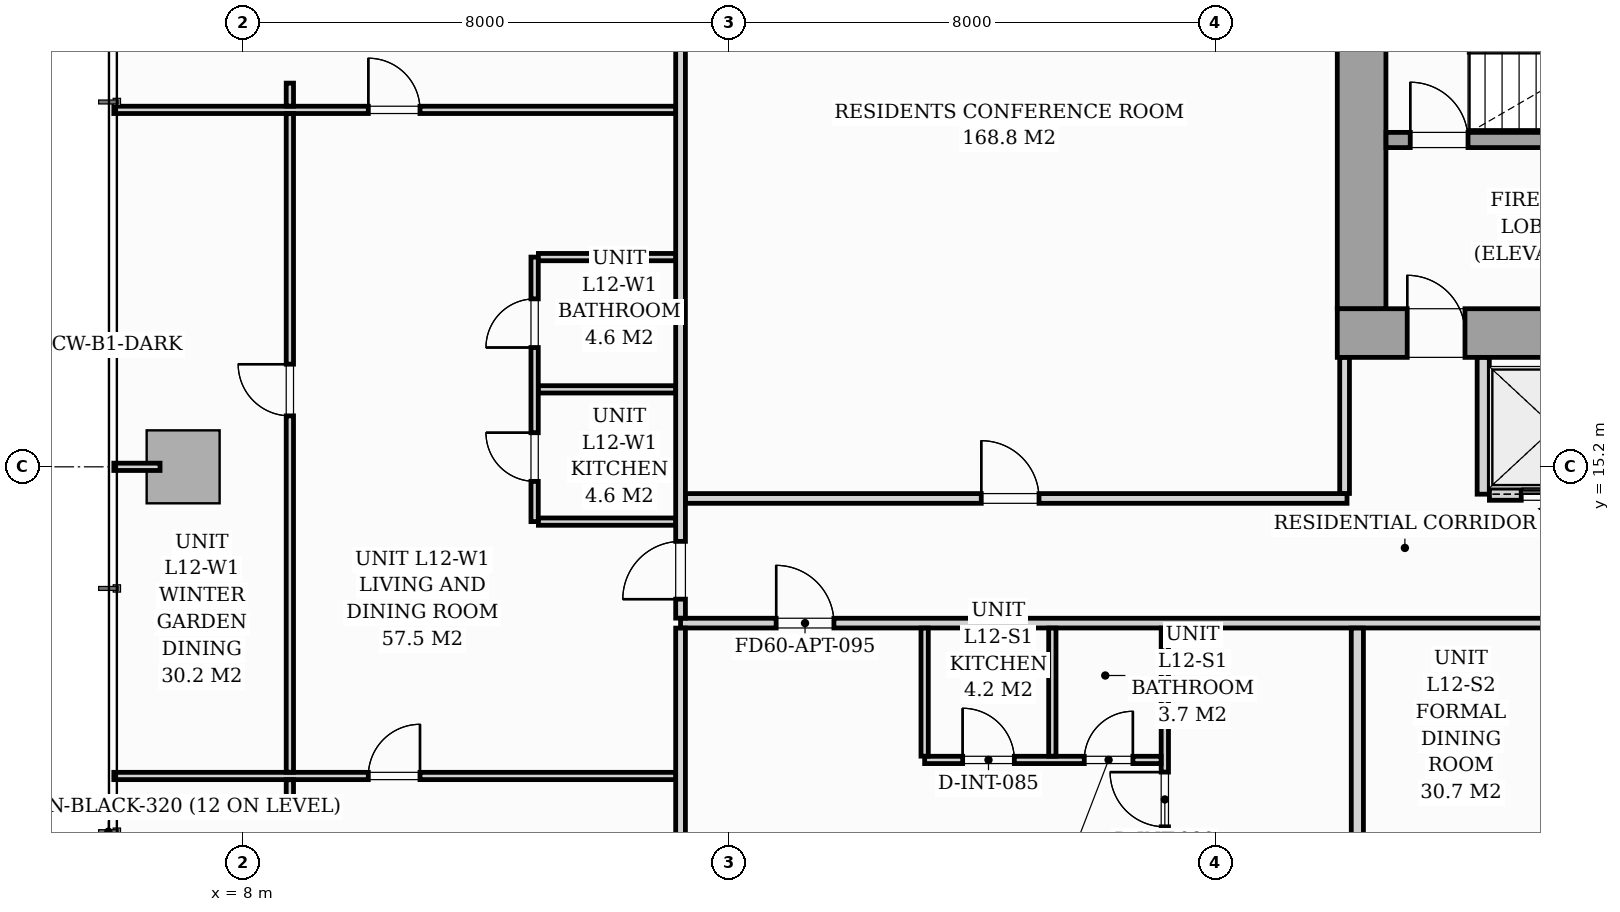
"""IFC4 building model, lengths in metres.
Left out: names, types, materials, properties, quantities, classifications, styles, units other than length and angle.
Written with IfcOpenShell. Run it as: python <this file> out.ifc"""

import sys

from ifc_helpers import new_model, si_unit, direction, frame, frame_2d, origin, origin_2d, place, context, subcontext, project, spatial, rectangle, i_section, extrude, source, transform, mapped, element, fill, save


model = new_model("IFC4")
c1 = context("Model", 3, precision=1e-05, world=origin(), true_north=direction((0.0, 1.0)))
c2 = subcontext(c1, "Body", "Model", "MODEL_VIEW")
j1 = project(units=[si_unit("LENGTHUNIT", "METRE"), si_unit("PLANEANGLEUNIT", "RADIAN")], contexts=[c1])
p1 = place(None, origin())
s1 = spatial("IfcSite", under=j1, at=p1, CompositionType="ELEMENT")
p2 = place(p1, origin())
s2 = spatial("IfcBuilding", under=s1, at=p2, CompositionType="ELEMENT")
p3 = place(p2, frame((0.0, 0.0, 45.4)))
s3 = spatial("IfcBuildingStorey", under=s2, at=p3, CompositionType="ELEMENT", Elevation=45.4)
m1 = source(origin(), c2, "Body", "SweptSolid", [
    extrude(i_section(OverallWidth=0.437, OverallDepth=0.514, WebThickness=0.061, FlangeThickness=0.097, FilletRadius=0.018, at=origin_2d()), origin(), (0.0, 0.0, 1.0), 3.196),
])
p4 = place(p3, frame((26.4, 17.4, 0.002), z_axis=(0.0, 0.0, 1.0), x_axis=(1.0, 0.0, 0.0)))
e1 = element("IfcColumn", 1, at=p4, inside=s3, PredefinedType="PILASTER", context=c2, shape_type="MappedRepresentation", body=[
    mapped(m1, transform((0.0, 0.0, 0.0), scale=1.0)),
])
m2 = source(origin(), c2, "Body", "SweptSolid", [
    extrude(rectangle(XDim=1.2, YDim=1.2, at=origin_2d()), origin(), (0.0, 0.0, 1.0), 3.196),
])
p5 = place(p3, frame((7.02, 15.2, 0.002), z_axis=(0.0, 0.0, 1.0), x_axis=(1.0, 0.0, 0.0)))
e2 = element("IfcColumn", 2, at=p5, inside=s3, PredefinedType="COLUMN", context=c2, shape_type="MappedRepresentation", body=[
    mapped(m2, transform((0.0, 0.0, 0.0), scale=1.0)),
])
p6 = place(p3, frame((26.0, 17.4, 0.0), z_axis=(0.0, 0.0, 1.0), x_axis=(1.0, 0.0, 0.0)))
e3 = element("IfcWall", 3, at=p6, inside=s3, PredefinedType="SHEAR", context=c2, shape_type="SweptSolid", body=[
    extrude(rectangle(XDim=20.0, YDim=0.8, at=frame_2d((10.0, 0.0))), origin(), (0.0, 0.0, 1.0), 3.2),
])
p7 = place(p6, frame((1.15, 0.0, 0.0)))
e4 = element("IfcOpeningElement", 4, at=p7, cuts=e3, PredefinedType="OPENING", context=c2, shape_type="SweptSolid", body=[
    extrude(rectangle(XDim=0.95, YDim=2.06, at=frame_2d((0.475, 1.03))), frame((0.0, 0.41, 0.0), z_axis=(0.0, -1.0, 0.0), x_axis=(1.0, 0.0, 0.0)), (0.0, 0.0, 1.0), 0.82),
])
p8 = place(p6, frame((9.58, 0.0, 0.0)))
e5 = element("IfcOpeningElement", 5, at=p8, cuts=e3, PredefinedType="OPENING", context=c2, shape_type="SweptSolid", body=[
    extrude(rectangle(XDim=0.85, YDim=2.0, at=frame_2d((0.425, 1.0))), frame((0.0, 0.41, 0.0), z_axis=(0.0, -1.0, 0.0), x_axis=(1.0, 0.0, 0.0)), (0.0, 0.0, 1.0), 0.82),
])
p9 = place(p6, frame((17.75, 0.0, 0.0)))
e6 = element("IfcOpeningElement", 6, at=p9, cuts=e3, PredefinedType="OPENING", context=c2, shape_type="SweptSolid", body=[
    extrude(rectangle(XDim=0.95, YDim=2.06, at=frame_2d((0.475, 1.03))), frame((0.0, 0.41, 0.0), z_axis=(0.0, -1.0, 0.0), x_axis=(1.0, 0.0, 0.0)), (0.0, 0.0, 1.0), 0.82),
])
p10 = place(p3, frame((26.4, 17.802, 0.0), z_axis=(0.0, 0.0, 1.0), x_axis=(0.0, 1.0, 0.0)))
e7 = element("IfcWall", 7, at=p10, inside=s3, PredefinedType="SHEAR", context=c2, shape_type="SweptSolid", body=[
    extrude(rectangle(XDim=5.796, YDim=0.8, at=frame_2d((2.898, 0.0))), origin(), (0.0, 0.0, 1.0), 3.2),
])
p11 = place(p3, frame((26.802, 20.575, 0.0), z_axis=(0.0, 0.0, 1.0), x_axis=(1.0, 0.0, 0.0)))
e8 = element("IfcWall", 8, at=p11, inside=s3, PredefinedType="SOLIDWALL", context=c2, shape_type="SweptSolid", body=[
    extrude(rectangle(XDim=8.148, YDim=0.25, at=frame_2d((4.074, 0.0))), origin(), (0.0, 0.0, 1.0), 3.2),
])
p12 = place(p11, frame((0.398, 0.0, 0.0)))
e9 = element("IfcOpeningElement", 9, at=p12, cuts=e8, PredefinedType="OPENING", context=c2, shape_type="SweptSolid", body=[
    extrude(rectangle(XDim=0.95, YDim=2.06, at=frame_2d((0.475, 1.03))), frame((0.0, 0.135, 0.0), z_axis=(0.0, -1.0, 0.0), x_axis=(1.0, 0.0, 0.0)), (0.0, 0.0, 1.0), 0.27),
])
p13 = place(p3, frame((28.4, 14.75, 0.0), z_axis=(0.0, 0.0, 1.0), x_axis=(0.0, 1.0, 0.0)))
e10 = element("IfcWall", 10, at=p13, inside=s3, PredefinedType="PARTITIONING", context=c2, shape_type="SweptSolid", body=[
    extrude(rectangle(XDim=2.248, YDim=0.2, at=frame_2d((1.124, 0.0))), origin(), (0.0, 0.0, 1.0), 2.94),
])
p14 = place(p3, frame((28.502, 14.75, 0.0), z_axis=(0.0, 0.0, 1.0), x_axis=(1.0, 0.0, 0.0)))
e11 = element("IfcWall", 11, at=p14, inside=s3, PredefinedType="PARTITIONING", context=c2, shape_type="SweptSolid", body=[
    extrude(rectangle(XDim=2.146, YDim=0.2, at=frame_2d((1.073, 0.0))), origin(), (0.0, 0.0, 1.0), 2.94),
])
p15 = place(p14, frame((0.523, 0.0, 0.0)))
e12 = element("IfcOpeningElement", 12, at=p15, cuts=e11, PredefinedType="OPENING", context=c2, shape_type="SweptSolid", body=[
    extrude(rectangle(XDim=1.05, YDim=2.08, at=frame_2d((0.525, 1.04))), frame((0.0, 0.11, 0.0), z_axis=(0.0, -1.0, 0.0), x_axis=(1.0, 0.0, 0.0)), (0.0, 0.0, 1.0), 0.22),
])
p16 = place(p3, frame((15.2, 12.63, 0.0), z_axis=(0.0, 0.0, 1.0), x_axis=(1.0, 0.0, 0.0)))
e13 = element("IfcWall", 13, at=p16, inside=s3, PredefinedType="PARTITIONING", context=c2, shape_type="SweptSolid", body=[
    extrude(rectangle(XDim=37.1, YDim=0.16, at=frame_2d((18.55, 0.0))), origin(), (0.0, 0.0, 1.0), 2.94),
])
p17 = place(p16, frame((1.572, 0.0, 0.0)))
e14 = element("IfcOpeningElement", 14, at=p17, cuts=e13, PredefinedType="OPENING", context=c2, shape_type="SweptSolid", body=[
    extrude(rectangle(XDim=0.95, YDim=2.06, at=frame_2d((0.475, 1.03))), frame((0.0, 0.09, 0.0), z_axis=(0.0, -1.0, 0.0), x_axis=(1.0, 0.0, 0.0)), (0.0, 0.0, 1.0), 0.18),
])
p18 = place(p16, frame((14.877, 0.0, 0.0)))
e15 = element("IfcOpeningElement", 15, at=p18, cuts=e13, PredefinedType="OPENING", context=c2, shape_type="SweptSolid", body=[
    extrude(rectangle(XDim=0.95, YDim=2.06, at=frame_2d((0.475, 1.03))), frame((0.0, 0.09, 0.0), z_axis=(0.0, -1.0, 0.0), x_axis=(1.0, 0.0, 0.0)), (0.0, 0.0, 1.0), 0.18),
])
p19 = place(p16, frame((28.476, 0.0, 0.0)))
e16 = element("IfcOpeningElement", 16, at=p19, cuts=e13, PredefinedType="OPENING", context=c2, shape_type="SweptSolid", body=[
    extrude(rectangle(XDim=0.95, YDim=2.06, at=frame_2d((0.475, 1.03))), frame((0.0, 0.09, 0.0), z_axis=(0.0, -1.0, 0.0), x_axis=(1.0, 0.0, 0.0)), (0.0, 0.0, 1.0), 0.18),
])
p20 = place(p3, frame((15.2, 2.962, 0.0), z_axis=(0.0, 0.0, 1.0), x_axis=(0.0, 1.0, 0.0)))
e17 = element("IfcWall", 17, at=p20, inside=s3, PredefinedType="PARTITIONING", context=c2, shape_type="SweptSolid", body=[
    extrude(rectangle(XDim=9.586, YDim=0.16, at=frame_2d((4.793, 0.0))), origin(), (0.0, 0.0, 1.0), 2.94),
])
p21 = place(p3, frame((15.2, 12.712, 0.0), z_axis=(0.0, 0.0, 1.0), x_axis=(0.0, 1.0, 0.0)))
e18 = element("IfcWall", 18, at=p21, inside=s3, PredefinedType="PARTITIONING", context=c2, shape_type="SweptSolid", body=[
    extrude(rectangle(XDim=14.726, YDim=0.16, at=frame_2d((7.363, 0.0))), origin(), (0.0, 0.0, 1.0), 2.94),
])
p22 = place(p21, frame((0.312, 0.0, 0.0)))
e19 = element("IfcOpeningElement", 19, at=p22, cuts=e18, PredefinedType="OPENING", context=c2, shape_type="SweptSolid", body=[
    extrude(rectangle(XDim=0.95, YDim=2.06, at=frame_2d((0.475, 1.03))), frame((0.0, 0.09, 0.0), z_axis=(0.0, -1.0, 0.0), x_axis=(1.0, 0.0, 0.0)), (0.0, 0.0, 1.0), 0.18),
])
p23 = place(p3, frame((23.164, 2.962, 0.0), z_axis=(0.0, 0.0, 1.0), x_axis=(0.0, 1.0, 0.0)))
e20 = element("IfcWall", 20, at=p23, inside=s3, PredefinedType="PARTITIONING", context=c2, shape_type="SweptSolid", body=[
    extrude(rectangle(XDim=9.586, YDim=0.12, at=frame_2d((4.793, 0.0))), origin(), (0.0, 0.0, 1.0), 2.94),
])
p24 = place(p23, frame((6.318, 0.0, 0.0)))
e21 = element("IfcOpeningElement", 21, at=p24, cuts=e20, PredefinedType="OPENING", context=c2, shape_type="SweptSolid", body=[
    extrude(rectangle(XDim=0.9, YDim=2.05, at=frame_2d((0.45, 1.025))), frame((0.0, 0.07, 0.0), z_axis=(0.0, -1.0, 0.0), x_axis=(1.0, 0.0, 0.0)), (0.0, 0.0, 1.0), 0.14),
])
p25 = place(p3, frame((19.214, 10.38, 0.0), z_axis=(0.0, 0.0, 1.0), x_axis=(1.0, 0.0, 0.0)))
e22 = element("IfcWall", 22, at=p25, inside=s3, PredefinedType="PARTITIONING", context=c2, shape_type="SweptSolid", body=[
    extrude(rectangle(XDim=3.888, YDim=0.12, at=frame_2d((1.944, 0.0))), origin(), (0.0, 0.0, 1.0), 2.94),
])
p26 = place(p25, frame((0.625, 0.0, 0.0)))
e23 = element("IfcOpeningElement", 23, at=p26, cuts=e22, PredefinedType="OPENING", context=c2, shape_type="SweptSolid", body=[
    extrude(rectangle(XDim=0.85, YDim=2.05, at=frame_2d((0.425, 1.025))), frame((0.0, 0.07, 0.0), z_axis=(0.0, -1.0, 0.0), x_axis=(1.0, 0.0, 0.0)), (0.0, 0.0, 1.0), 0.14),
])
p27 = place(p25, frame((2.625, 0.0, 0.0)))
e24 = element("IfcOpeningElement", 24, at=p27, cuts=e22, PredefinedType="OPENING", context=c2, shape_type="SweptSolid", body=[
    extrude(rectangle(XDim=0.8, YDim=2.02, at=frame_2d((0.4, 1.01))), frame((0.0, 0.07, 0.0), z_axis=(0.0, -1.0, 0.0), x_axis=(1.0, 0.0, 0.0)), (0.0, 0.0, 1.0), 0.14),
])
for number, where, z_axis, x_axis in (
    (25, (21.314, 10.442, 0.0), (0.0, 0.0, 1.0), (0.0, 1.0, 0.0)),
    (26, (19.214, 10.442, 0.0), (0.0, 0.0, 1.0), (0.0, 1.0, 0.0)),
):
    element("IfcWall", number, at=place(p3, frame(where, z_axis=z_axis, x_axis=x_axis)), inside=s3, PredefinedType="PARTITIONING", context=c2, shape_type="SweptSolid", body=[
        extrude(rectangle(XDim=2.106, YDim=0.12, at=frame_2d((1.053, 0.0))), origin(), (0.0, 0.0, 1.0), 2.94),
    ])
p28 = place(p3, frame((26.33, 2.78, 0.0), z_axis=(0.0, 0.0, 1.0), x_axis=(0.0, 1.0, 0.0)))
e27 = element("IfcWall", 27, at=p28, inside=s3, PredefinedType="PARTITIONING", context=c2, shape_type="SweptSolid", body=[
    extrude(rectangle(XDim=9.768, YDim=0.2, at=frame_2d((4.884, 0.0))), origin(), (0.0, 0.0, 1.0), 2.94),
])
p29 = place(p3, frame((12.8, 14.299, 0.0), z_axis=(0.0, 0.0, 1.0), x_axis=(0.0, 1.0, 0.0)))
e28 = element("IfcWall", 28, at=p29, inside=s3, PredefinedType="PARTITIONING", context=c2, shape_type="SweptSolid", body=[
    extrude(rectangle(XDim=4.35, YDim=0.12, at=frame_2d((2.175, 0.0))), origin(), (0.0, 0.0, 1.0), 2.94),
])
p30 = place(p29, frame((0.662, 0.0, 0.0)))
e29 = element("IfcOpeningElement", 29, at=p30, cuts=e28, PredefinedType="OPENING", context=c2, shape_type="SweptSolid", body=[
    extrude(rectangle(XDim=0.8, YDim=2.0, at=frame_2d((0.4, 1.0))), frame((0.0, 0.07, 0.0), z_axis=(0.0, -1.0, 0.0), x_axis=(1.0, 0.0, 0.0)), (0.0, 0.0, 1.0), 0.14),
])
p31 = place(p29, frame((2.863, 0.0, 0.0)))
e30 = element("IfcOpeningElement", 30, at=p31, cuts=e28, PredefinedType="OPENING", context=c2, shape_type="SweptSolid", body=[
    extrude(rectangle(XDim=0.8, YDim=2.02, at=frame_2d((0.4, 1.01))), frame((0.0, 0.07, 0.0), z_axis=(0.0, -1.0, 0.0), x_axis=(1.0, 0.0, 0.0)), (0.0, 0.0, 1.0), 0.14),
])
for number, where, z_axis, x_axis in (
    (31, (12.862, 16.474, 0.0), (0.0, 0.0, 1.0), (1.0, 0.0, 0.0)),
    (32, (12.862, 14.299, 0.0), (0.0, 0.0, 1.0), (1.0, 0.0, 0.0)),
    (33, (12.862, 18.649, 0.0), (0.0, 0.0, 1.0), (1.0, 0.0, 0.0)),
):
    element("IfcWall", number, at=place(p3, frame(where, z_axis=z_axis, x_axis=x_axis)), inside=s3, PredefinedType="PARTITIONING", context=c2, shape_type="SweptSolid", body=[
        extrude(rectangle(XDim=2.256, YDim=0.12, at=frame_2d((1.128, 0.0))), origin(), (0.0, 0.0, 1.0), 2.94),
    ])
p32 = place(p3, frame((5.88, 10.116, 0.0), z_axis=(0.0, 0.0, 1.0), x_axis=(1.0, 0.0, 0.0)))
e34 = element("IfcWall", 34, at=p32, inside=s3, PredefinedType="PARTITIONING", context=c2, shape_type="SweptSolid", body=[
    extrude(rectangle(XDim=9.238, YDim=0.12, at=frame_2d((4.619, 0.0))), origin(), (0.0, 0.0, 1.0), 2.94),
])
p33 = place(p32, frame((4.185, 0.0, 0.0)))
e35 = element("IfcOpeningElement", 35, at=p33, cuts=e34, PredefinedType="OPENING", context=c2, shape_type="SweptSolid", body=[
    extrude(rectangle(XDim=0.85, YDim=2.05, at=frame_2d((0.425, 1.025))), frame((0.0, 0.07, 0.0), z_axis=(0.0, -1.0, 0.0), x_axis=(1.0, 0.0, 0.0)), (0.0, 0.0, 1.0), 0.14),
])
p34 = place(p3, frame((5.88, 21.07, 0.0), z_axis=(0.0, 0.0, 1.0), x_axis=(1.0, 0.0, 0.0)))
e36 = element("IfcWall", 36, at=p34, inside=s3, PredefinedType="PARTITIONING", context=c2, shape_type="SweptSolid", body=[
    extrude(rectangle(XDim=9.238, YDim=0.12, at=frame_2d((4.619, 0.0))), origin(), (0.0, 0.0, 1.0), 2.94),
])
p35 = place(p34, frame((4.185, 0.0, 0.0)))
e37 = element("IfcOpeningElement", 37, at=p35, cuts=e36, PredefinedType="OPENING", context=c2, shape_type="SweptSolid", body=[
    extrude(rectangle(XDim=0.85, YDim=2.05, at=frame_2d((0.425, 1.025))), frame((0.0, 0.07, 0.0), z_axis=(0.0, -1.0, 0.0), x_axis=(1.0, 0.0, 0.0)), (0.0, 0.0, 1.0), 0.14),
])
p36 = place(p3, frame((8.775, 9.676, 0.0), z_axis=(0.0, 0.0, 1.0), x_axis=(0.0, 1.0, 0.0)))
e38 = element("IfcWall", 38, at=p36, inside=s3, PredefinedType="PARTITIONING", context=c2, shape_type="SweptSolid", body=[
    extrude(rectangle(XDim=0.378, YDim=0.12, at=frame_2d((0.189, 0.0))), origin(), (0.0, 0.0, 1.0), 2.94),
])
p37 = place(p3, frame((8.775, 10.178, 0.0), z_axis=(0.0, 0.0, 1.0), x_axis=(0.0, 1.0, 0.0)))
e39 = element("IfcWall", 39, at=p37, inside=s3, PredefinedType="PARTITIONING", context=c2, shape_type="SweptSolid", body=[
    extrude(rectangle(XDim=10.83, YDim=0.12, at=frame_2d((5.415, 0.0))), origin(), (0.0, 0.0, 1.0), 2.94),
])
p38 = place(p37, frame((5.86, 0.0, 0.0)))
e40 = element("IfcOpeningElement", 40, at=p38, cuts=e39, PredefinedType="OPENING", context=c2, shape_type="SweptSolid", body=[
    extrude(rectangle(XDim=0.85, YDim=2.05, at=frame_2d((0.425, 1.025))), frame((0.0, 0.07, 0.0), z_axis=(0.0, -1.0, 0.0), x_axis=(1.0, 0.0, 0.0)), (0.0, 0.0, 1.0), 0.14),
])
p39 = place(p3, frame((8.775, 21.132, 0.0), z_axis=(0.0, 0.0, 1.0), x_axis=(0.0, 1.0, 0.0)))
e41 = element("IfcWall", 41, at=p39, inside=s3, PredefinedType="PARTITIONING", context=c2, shape_type="SweptSolid", body=[
    extrude(rectangle(XDim=0.378, YDim=0.12, at=frame_2d((0.189, 0.0))), origin(), (0.0, 0.0, 1.0), 2.94),
])
p40 = place(p3, frame((15.282, 14.68, 0.0), z_axis=(0.0, 0.0, 1.0), x_axis=(1.0, 0.0, 0.0)))
e42 = element("IfcWall", 42, at=p40, inside=s3, PredefinedType="PARTITIONING", context=c2, shape_type="SweptSolid", body=[
    extrude(rectangle(XDim=10.878, YDim=0.16, at=frame_2d((5.439, 0.0))), origin(), (0.0, 0.0, 1.0), 2.94),
])
p41 = place(p40, frame((4.863, 0.0, 0.0)))
e43 = element("IfcOpeningElement", 43, at=p41, cuts=e42, PredefinedType="OPENING", context=c2, shape_type="SweptSolid", body=[
    extrude(rectangle(XDim=0.95, YDim=2.06, at=frame_2d((0.475, 1.03))), frame((0.0, 0.09, 0.0), z_axis=(0.0, -1.0, 0.0), x_axis=(1.0, 0.0, 0.0)), (0.0, 0.0, 1.0), 0.18),
])
p42 = place(p3, frame((26.12, 14.762, 0.0), z_axis=(0.0, 0.0, 1.0), x_axis=(0.0, 1.0, 0.0)))
e44 = element("IfcWall", 44, at=p42, inside=s3, PredefinedType="PARTITIONING", context=c2, shape_type="SweptSolid", body=[
    extrude(rectangle(XDim=2.236, YDim=0.16, at=frame_2d((1.118, 0.0))), origin(), (0.0, 0.0, 1.0), 2.94),
])
p43 = place(p3, frame((6.64, 15.2, 0.0), z_axis=(0.0, 0.0, 1.0), x_axis=(-1.0, 0.0, 0.0)))
e45 = element("IfcWall", 45, at=p43, inside=s3, PredefinedType="PARTITIONING", context=c2, shape_type="SweptSolid", body=[
    extrude(rectangle(XDim=0.76, YDim=0.12, at=frame_2d((0.38, 0.0))), origin(), (0.0, 0.0, 1.0), 2.94),
])
m3 = source(origin(), c2, "Body", "SweptSolid", [
    extrude(rectangle(XDim=0.95, YDim=2.06, at=frame_2d((0.475, 1.03))), frame((0.0, 0.025, 0.0), z_axis=(0.0, -1.0, 0.0), x_axis=(1.0, 0.0, 0.0)), (0.0, 0.0, 1.0), 0.05),
])
p44 = place(p7, origin())
e46 = element("IfcDoor", 46, at=p44, inside=s3, OperationType="SINGLE_SWING_LEFT", PredefinedType="DOOR", context=c2, shape_type="MappedRepresentation", body=[
    mapped(m3, transform((0.0, 0.0, 0.0), scale=1.0)),
])
fill(e4, e46)
p45 = place(p12, origin())
e47 = element("IfcDoor", 47, at=p45, inside=s3, OperationType="SINGLE_SWING_LEFT", PredefinedType="DOOR", context=c2, shape_type="MappedRepresentation", body=[
    mapped(m3, transform((0.0, 0.0, 0.0), scale=1.0)),
])
fill(e9, e47)
m4 = source(origin(), c2, "Body", "SweptSolid", [
    extrude(rectangle(XDim=1.05, YDim=2.08, at=frame_2d((0.525, 1.04))), frame((0.0, 0.025, 0.0), z_axis=(0.0, -1.0, 0.0), x_axis=(1.0, 0.0, 0.0)), (0.0, 0.0, 1.0), 0.05),
])
p46 = place(p15, origin())
e48 = element("IfcDoor", 48, at=p46, inside=s3, OperationType="SLIDING_TO_LEFT", PredefinedType="DOOR", context=c2, shape_type="MappedRepresentation", body=[
    mapped(m4, transform((0.0, 0.0, 0.0), scale=1.0)),
])
fill(e12, e48)
m5 = source(origin(), c2, "Body", "SweptSolid", [
    extrude(rectangle(XDim=0.95, YDim=2.06, at=frame_2d((0.475, 1.03))), frame((0.0, 0.025, 0.0), z_axis=(0.0, -1.0, 0.0), x_axis=(1.0, 0.0, 0.0)), (0.0, 0.0, 1.0), 0.05),
])
p47 = place(p17, origin())
e49 = element("IfcDoor", 49, at=p47, inside=s3, OperationType="SINGLE_SWING_LEFT", PredefinedType="DOOR", context=c2, shape_type="MappedRepresentation", body=[
    mapped(m5, transform((0.0, 0.0, 0.0), scale=1.0)),
])
fill(e14, e49)
m6 = source(origin(), c2, "Body", "SweptSolid", [
    extrude(rectangle(XDim=0.9, YDim=2.05, at=frame_2d((0.45, 1.025))), frame((0.0, 0.025, 0.0), z_axis=(0.0, -1.0, 0.0), x_axis=(1.0, 0.0, 0.0)), (0.0, 0.0, 1.0), 0.05),
])
p48 = place(p24, origin())
e50 = element("IfcDoor", 50, at=p48, inside=s3, OperationType="SINGLE_SWING_RIGHT", PredefinedType="DOOR", context=c2, shape_type="MappedRepresentation", body=[
    mapped(m6, transform((0.0, 0.0, 0.0), scale=1.0)),
])
fill(e21, e50)
m7 = source(origin(), c2, "Body", "SweptSolid", [
    extrude(rectangle(XDim=0.85, YDim=2.05, at=frame_2d((0.425, 1.025))), frame((0.0, 0.025, 0.0), z_axis=(0.0, -1.0, 0.0), x_axis=(1.0, 0.0, 0.0)), (0.0, 0.0, 1.0), 0.05),
])
p49 = place(p26, origin())
e51 = element("IfcDoor", 51, at=p49, inside=s3, OperationType="SINGLE_SWING_LEFT", PredefinedType="DOOR", context=c2, shape_type="MappedRepresentation", body=[
    mapped(m7, transform((0.0, 0.0, 0.0), scale=1.0)),
])
fill(e23, e51)
m8 = source(origin(), c2, "Body", "SweptSolid", [
    extrude(rectangle(XDim=0.8, YDim=2.02, at=frame_2d((0.4, 1.01))), frame((0.0, 0.025, 0.0), z_axis=(0.0, -1.0, 0.0), x_axis=(1.0, 0.0, 0.0)), (0.0, 0.0, 1.0), 0.05),
])
p50 = place(p27, origin())
e52 = element("IfcDoor", 52, at=p50, inside=s3, OperationType="SINGLE_SWING_RIGHT", PredefinedType="DOOR", context=c2, shape_type="MappedRepresentation", body=[
    mapped(m8, transform((0.0, 0.0, 0.0), scale=1.0)),
])
fill(e24, e52)
p51 = place(p22, origin())
e53 = element("IfcDoor", 53, at=p51, inside=s3, OperationType="SINGLE_SWING_LEFT", PredefinedType="DOOR", context=c2, shape_type="MappedRepresentation", body=[
    mapped(m5, transform((0.0, 0.0, 0.0), scale=1.0)),
])
fill(e19, e53)
m9 = source(origin(), c2, "Body", "SweptSolid", [
    extrude(rectangle(XDim=0.8, YDim=2.0, at=frame_2d((0.4, 1.0))), frame((0.0, 0.025, 0.0), z_axis=(0.0, -1.0, 0.0), x_axis=(1.0, 0.0, 0.0)), (0.0, 0.0, 1.0), 0.05),
])
p52 = place(p30, origin())
e54 = element("IfcDoor", 54, at=p52, inside=s3, OperationType="SINGLE_SWING_RIGHT", PredefinedType="DOOR", context=c2, shape_type="MappedRepresentation", body=[
    mapped(m9, transform((0.0, 0.0, 0.0), scale=1.0)),
])
fill(e29, e54)
p53 = place(p31, origin())
e55 = element("IfcDoor", 55, at=p53, inside=s3, OperationType="SINGLE_SWING_LEFT", PredefinedType="DOOR", context=c2, shape_type="MappedRepresentation", body=[
    mapped(m8, transform((0.0, 0.0, 0.0), scale=1.0)),
])
fill(e30, e55)
p54 = place(p33, origin())
e56 = element("IfcDoor", 56, at=p54, inside=s3, OperationType="SINGLE_SWING_RIGHT", PredefinedType="DOOR", context=c2, shape_type="MappedRepresentation", body=[
    mapped(m7, transform((0.0, 0.0, 0.0), scale=1.0)),
])
fill(e35, e56)
p55 = place(p35, origin())
e57 = element("IfcDoor", 57, at=p55, inside=s3, OperationType="SINGLE_SWING_LEFT", PredefinedType="DOOR", context=c2, shape_type="MappedRepresentation", body=[
    mapped(m7, transform((0.0, 0.0, 0.0), scale=1.0)),
])
fill(e37, e57)
p56 = place(p38, origin())
e58 = element("IfcDoor", 58, at=p56, inside=s3, OperationType="SINGLE_SWING_RIGHT", PredefinedType="DOOR", context=c2, shape_type="MappedRepresentation", body=[
    mapped(m7, transform((0.0, 0.0, 0.0), scale=1.0)),
])
fill(e40, e58)
p57 = place(p41, origin())
e59 = element("IfcDoor", 59, at=p57, inside=s3, OperationType="SINGLE_SWING_LEFT", PredefinedType="DOOR", context=c2, shape_type="MappedRepresentation", body=[
    mapped(m5, transform((0.0, 0.0, 0.0), scale=1.0)),
])
fill(e43, e59)
save(model, sys.argv[1])
